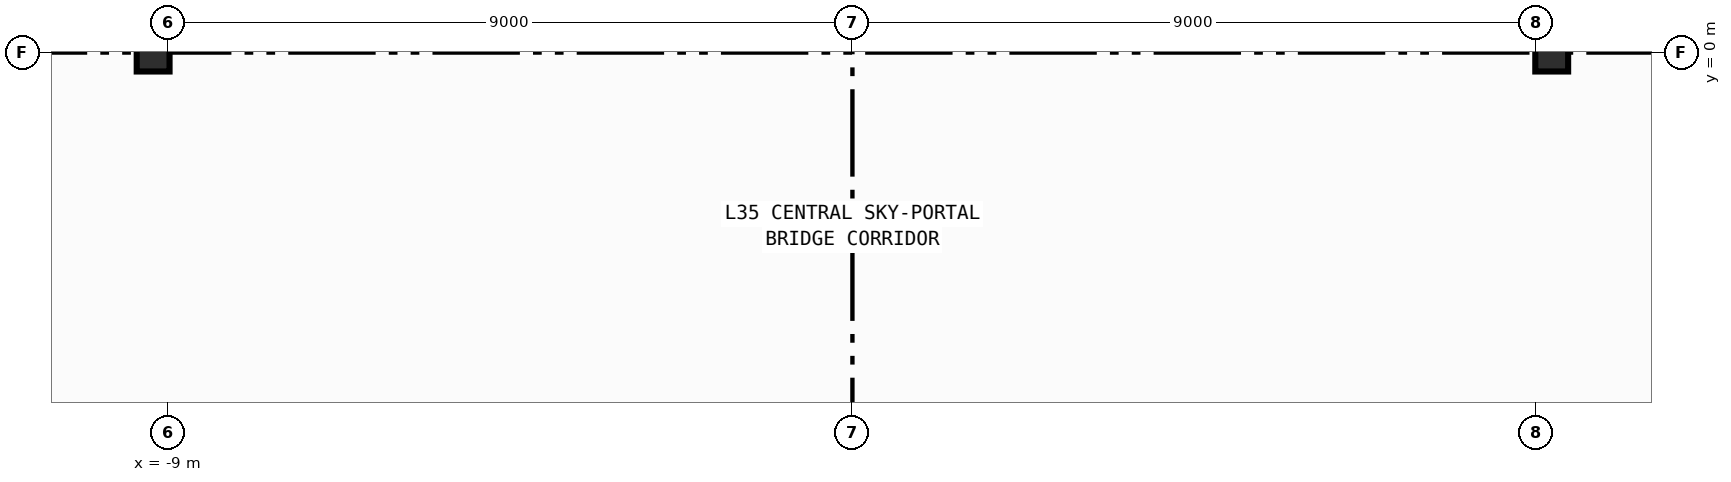
"""IFC4 building model, lengths in metres.
Left out: names, types, materials, properties, quantities, classifications, styles, units other than length and angle.
Written with IfcOpenShell. Run it as: python <this file> out.ifc"""

import sys

from ifc_helpers import new_model, si_unit, direction, frame, origin, origin_2d, place, context, subcontext, project, spatial, i_section, extrude, element, save


model = new_model("IFC4")
c1 = context("Model", 3, precision=1e-05, world=origin(), true_north=direction((0.0, 1.0)))
c2 = subcontext(c1, "Body", "Model", "MODEL_VIEW")
j1 = project(units=[si_unit("LENGTHUNIT", "METRE"), si_unit("PLANEANGLEUNIT", "RADIAN")], contexts=[c1])
p1 = place(None, origin())
s1 = spatial("IfcSite", under=j1, at=p1, CompositionType="ELEMENT")
p2 = place(p1, origin())
s2 = spatial("IfcBuilding", under=s1, at=p2, CompositionType="ELEMENT")
p3 = place(p2, frame((0.0, 0.0, 152.0)))
s3 = spatial("IfcBuildingStorey", under=s2, at=p3, CompositionType="ELEMENT", Elevation=152.0)
for number, where, z_axis, x_axis in (
    (1, (-9.2, 0.0, 0.0), (0.0, 0.0, 1.0), (1.0, 0.0, 0.0)),
    (2, (9.2, 0.0, 0.0), (0.0, 0.0, 1.0), (1.0, 0.0, 0.0)),
):
    element("IfcColumn", number, at=place(p3, frame(where, z_axis=z_axis, x_axis=x_axis)), inside=s3, PredefinedType="COLUMN", context=c2, shape_type="SweptSolid", body=[
        extrude(i_section(OverallWidth=0.432, OverallDepth=0.498, WebThickness=0.045, FlangeThickness=0.07, FilletRadius=0.022, at=origin_2d()), origin(), (0.0, 0.0, 1.0), 8.4),
    ])
save(model, sys.argv[1])
